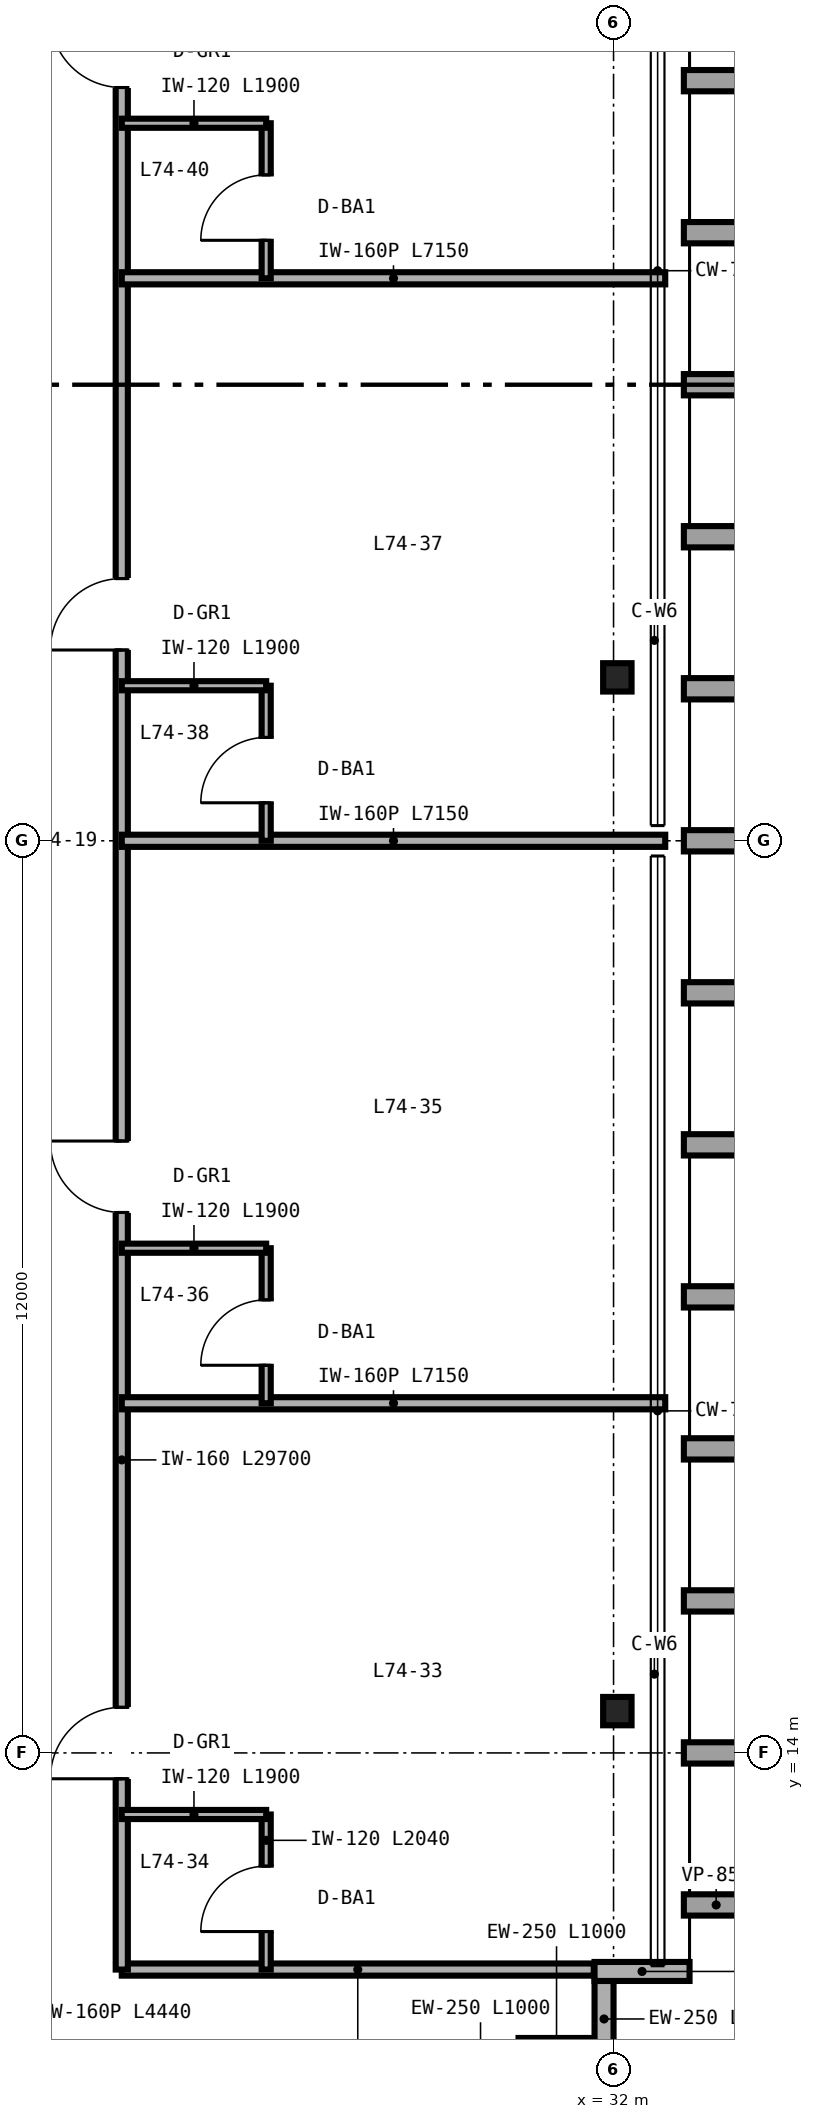
"""IFC4 building model, lengths in metres.
Left out: names, types, materials, properties, quantities, classifications, styles, units other than length and angle.
Written with IfcOpenShell. Run it as: python <this file> out.ifc"""

import sys

from ifc_helpers import new_model, si_unit, direction, frame, frame_2d, origin, origin_2d, place, context, subcontext, project, spatial, rectangle, i_section, extrude, source, transform, mapped, element, fill, save


model = new_model("IFC4")
c1 = context("Model", 3, precision=1e-05, world=origin(), true_north=direction((0.0, 1.0)))
c2 = subcontext(c1, "Body", "Model", "MODEL_VIEW")
j1 = project(units=[si_unit("LENGTHUNIT", "METRE"), si_unit("PLANEANGLEUNIT", "RADIAN")], contexts=[c1])
p1 = place(None, origin())
s1 = spatial("IfcSite", under=j1, at=p1, CompositionType="ELEMENT")
p2 = place(p1, origin())
s2 = spatial("IfcBuilding", under=s1, at=p2, CompositionType="ELEMENT")
p3 = place(p2, frame((0.0, 0.0, 290.4)))
s3 = spatial("IfcBuildingStorey", under=s2, at=p3, CompositionType="ELEMENT", Elevation=290.4)
m1 = source(origin(), c2, "Body", "SweptSolid", [
    extrude(i_section(OverallWidth=0.374, OverallDepth=0.373, WebThickness=0.016, FlangeThickness=0.026, FilletRadius=0.025, at=origin_2d()), origin(), (0.0, 0.0, 1.0), 3.38),
])
for number, where, z_axis, x_axis in (
    (1, (32.05, 14.55, 0.0), (0.0, 0.0, 1.0), (1.0, 0.0, 0.0)),
    (2, (32.05, 28.15, 0.0), (0.0, 0.0, 1.0), (1.0, 0.0, 0.0)),
):
    element("IfcColumn", number, at=place(p3, frame(where, z_axis=z_axis, x_axis=x_axis)), inside=s3, PredefinedType="COLUMN", context=c2, shape_type="MappedRepresentation", body=[
        mapped(m1, transform((0.0, 0.0, 0.0), scale=1.0)),
    ])
for number, where, z_axis, x_axis in (
    (3, (30.75, 10.125, 0.0), (0.0, 0.0, 1.0), (1.0, 0.0, 0.0)),
    (4, (31.875, 10.0, 0.0), (0.0, 0.0, 1.0), (0.0, 1.0, 0.0)),
):
    element("IfcWall", number, at=place(p3, frame(where, z_axis=z_axis, x_axis=x_axis)), inside=s3, PredefinedType="SOLIDWALL", context=c2, shape_type="SweptSolid", body=[
        extrude(rectangle(XDim=1.0, YDim=0.25, at=frame_2d((0.5, 0.0))), origin(), (0.0, 0.0, 1.0), 3.38),
    ])
p4 = place(p3, frame((31.75, 11.125, 0.0), z_axis=(0.0, 0.0, 1.0), x_axis=(1.0, 0.0, 0.0)))
e5 = element("IfcWall", 5, at=p4, inside=s3, PredefinedType="SOLIDWALL", context=c2, shape_type="SweptSolid", body=[
    extrude(rectangle(XDim=1.25, YDim=0.25, at=frame_2d((0.625, 0.0))), origin(), (0.0, 0.0, 1.0), 3.38),
])
p5 = place(p3, frame((25.53, 11.15, 0.0), z_axis=(0.0, 0.0, 1.0), x_axis=(1.0, 0.0, 0.0)))
e6 = element("IfcWall", 6, at=p5, inside=s3, PredefinedType="PARTITIONING", context=c2, shape_type="SweptSolid", body=[
    extrude(rectangle(XDim=6.21, YDim=0.16, at=frame_2d((3.105, 0.0))), origin(), (0.0, 0.0, 1.0), 3.38),
])
p6 = place(p3, frame((25.53, 11.15, 0.0), z_axis=(0.0, 0.0, 1.0), x_axis=(0.0, 1.0, 0.0)))
e7 = element("IfcWall", 7, at=p6, inside=s3, PredefinedType="PARTITIONING", context=c2, shape_type="SweptSolid", body=[
    extrude(rectangle(XDim=29.7, YDim=0.16, at=frame_2d((14.85, 0.0))), origin(), (0.0, 0.0, 1.0), 2.524),
])
p7 = place(p6, frame((2.51, 0.0, 0.0)))
e8 = element("IfcOpeningElement", 8, at=p7, cuts=e7, PredefinedType="OPENING", context=c2, shape_type="SweptSolid", body=[
    extrude(rectangle(XDim=0.94, YDim=2.15, at=frame_2d((0.47, 1.075))), frame((0.0, 0.09, 0.0), z_axis=(0.0, -1.0, 0.0), x_axis=(1.0, 0.0, 0.0)), (0.0, 0.0, 1.0), 0.18),
])
p8 = place(p6, frame((9.96, 0.0, 0.0)))
e9 = element("IfcOpeningElement", 9, at=p8, cuts=e7, PredefinedType="OPENING", context=c2, shape_type="SweptSolid", body=[
    extrude(rectangle(XDim=0.94, YDim=2.15, at=frame_2d((0.47, 1.075))), frame((0.0, 0.09, 0.0), z_axis=(0.0, -1.0, 0.0), x_axis=(1.0, 0.0, 0.0)), (0.0, 0.0, 1.0), 0.18),
])
p9 = place(p6, frame((17.36, 0.0, 0.0)))
e10 = element("IfcOpeningElement", 10, at=p9, cuts=e7, PredefinedType="OPENING", context=c2, shape_type="SweptSolid", body=[
    extrude(rectangle(XDim=0.94, YDim=2.15, at=frame_2d((0.47, 1.075))), frame((0.0, 0.09, 0.0), z_axis=(0.0, -1.0, 0.0), x_axis=(1.0, 0.0, 0.0)), (0.0, 0.0, 1.0), 0.18),
])
p10 = place(p6, frame((24.76, 0.0, 0.0)))
e11 = element("IfcOpeningElement", 11, at=p10, cuts=e7, PredefinedType="OPENING", context=c2, shape_type="SweptSolid", body=[
    extrude(rectangle(XDim=0.94, YDim=2.15, at=frame_2d((0.47, 1.075))), frame((0.0, 0.09, 0.0), z_axis=(0.0, -1.0, 0.0), x_axis=(1.0, 0.0, 0.0)), (0.0, 0.0, 1.0), 0.18),
])
p11 = place(p3, frame((25.53, 18.6, 0.0), z_axis=(0.0, 0.0, 1.0), x_axis=(1.0, 0.0, 0.0)))
e12 = element("IfcWall", 12, at=p11, inside=s3, PredefinedType="PARTITIONING", context=c2, shape_type="SweptSolid", body=[
    extrude(rectangle(XDim=7.15, YDim=0.16, at=frame_2d((3.575, 0.0))), origin(), (0.0, 0.0, 1.0), 2.601),
])
p12 = place(p3, frame((27.43, 11.15, 0.0), z_axis=(0.0, 0.0, 1.0), x_axis=(0.0, 1.0, 0.0)))
e13 = element("IfcWall", 13, at=p12, inside=s3, PredefinedType="PARTITIONING", context=c2, shape_type="SweptSolid", body=[
    extrude(rectangle(XDim=2.04, YDim=0.12, at=frame_2d((1.02, 0.0))), origin(), (0.0, 0.0, 1.0), 3.38),
])
p13 = place(p12, frame((0.5, 0.0, 0.0)))
e14 = element("IfcOpeningElement", 14, at=p13, cuts=e13, PredefinedType="OPENING", context=c2, shape_type="SweptSolid", body=[
    extrude(rectangle(XDim=0.86, YDim=2.1, at=frame_2d((0.43, 1.05))), frame((0.0, 0.07, 0.0), z_axis=(0.0, -1.0, 0.0), x_axis=(1.0, 0.0, 0.0)), (0.0, 0.0, 1.0), 0.14),
])
p14 = place(p3, frame((25.53, 13.19, 0.0), z_axis=(0.0, 0.0, 1.0), x_axis=(1.0, 0.0, 0.0)))
e15 = element("IfcWall", 15, at=p14, inside=s3, PredefinedType="PARTITIONING", context=c2, shape_type="SweptSolid", body=[
    extrude(rectangle(XDim=1.9, YDim=0.12, at=frame_2d((0.95, 0.0))), origin(), (0.0, 0.0, 1.0), 3.38),
])
p15 = place(p3, frame((25.53, 26.0, 0.0), z_axis=(0.0, 0.0, 1.0), x_axis=(1.0, 0.0, 0.0)))
e16 = element("IfcWall", 16, at=p15, inside=s3, PredefinedType="PARTITIONING", context=c2, shape_type="SweptSolid", body=[
    extrude(rectangle(XDim=7.15, YDim=0.16, at=frame_2d((3.575, 0.0))), origin(), (0.0, 0.0, 1.0), 2.601),
])
p16 = place(p3, frame((27.43, 18.6, 0.0), z_axis=(0.0, 0.0, 1.0), x_axis=(0.0, 1.0, 0.0)))
e17 = element("IfcWall", 17, at=p16, inside=s3, PredefinedType="PARTITIONING", context=c2, shape_type="SweptSolid", body=[
    extrude(rectangle(XDim=2.04, YDim=0.12, at=frame_2d((1.02, 0.0))), origin(), (0.0, 0.0, 1.0), 3.38),
])
p17 = place(p16, frame((0.5, 0.0, 0.0)))
e18 = element("IfcOpeningElement", 18, at=p17, cuts=e17, PredefinedType="OPENING", context=c2, shape_type="SweptSolid", body=[
    extrude(rectangle(XDim=0.86, YDim=2.1, at=frame_2d((0.43, 1.05))), frame((0.0, 0.07, 0.0), z_axis=(0.0, -1.0, 0.0), x_axis=(1.0, 0.0, 0.0)), (0.0, 0.0, 1.0), 0.14),
])
p18 = place(p3, frame((25.53, 20.64, 0.0), z_axis=(0.0, 0.0, 1.0), x_axis=(1.0, 0.0, 0.0)))
e19 = element("IfcWall", 19, at=p18, inside=s3, PredefinedType="PARTITIONING", context=c2, shape_type="SweptSolid", body=[
    extrude(rectangle(XDim=1.9, YDim=0.12, at=frame_2d((0.95, 0.0))), origin(), (0.0, 0.0, 1.0), 3.38),
])
p19 = place(p3, frame((25.53, 33.4, 0.0), z_axis=(0.0, 0.0, 1.0), x_axis=(1.0, 0.0, 0.0)))
e20 = element("IfcWall", 20, at=p19, inside=s3, PredefinedType="PARTITIONING", context=c2, shape_type="SweptSolid", body=[
    extrude(rectangle(XDim=7.15, YDim=0.16, at=frame_2d((3.575, 0.0))), origin(), (0.0, 0.0, 1.0), 2.763),
])
p20 = place(p3, frame((27.43, 26.0, 0.0), z_axis=(0.0, 0.0, 1.0), x_axis=(0.0, 1.0, 0.0)))
e21 = element("IfcWall", 21, at=p20, inside=s3, PredefinedType="PARTITIONING", context=c2, shape_type="SweptSolid", body=[
    extrude(rectangle(XDim=2.04, YDim=0.12, at=frame_2d((1.02, 0.0))), origin(), (0.0, 0.0, 1.0), 2.524),
])
p21 = place(p20, frame((0.5, 0.0, 0.0)))
e22 = element("IfcOpeningElement", 22, at=p21, cuts=e21, PredefinedType="OPENING", context=c2, shape_type="SweptSolid", body=[
    extrude(rectangle(XDim=0.86, YDim=2.1, at=frame_2d((0.43, 1.05))), frame((0.0, 0.07, 0.0), z_axis=(0.0, -1.0, 0.0), x_axis=(1.0, 0.0, 0.0)), (0.0, 0.0, 1.0), 0.14),
])
p22 = place(p3, frame((25.53, 28.04, 0.0), z_axis=(0.0, 0.0, 1.0), x_axis=(1.0, 0.0, 0.0)))
e23 = element("IfcWall", 23, at=p22, inside=s3, PredefinedType="PARTITIONING", context=c2, shape_type="SweptSolid", body=[
    extrude(rectangle(XDim=1.9, YDim=0.12, at=frame_2d((0.95, 0.0))), origin(), (0.0, 0.0, 1.0), 2.524),
])
p23 = place(p3, frame((27.43, 33.4, 0.0), z_axis=(0.0, 0.0, 1.0), x_axis=(0.0, 1.0, 0.0)))
e24 = element("IfcWall", 24, at=p23, inside=s3, PredefinedType="PARTITIONING", context=c2, shape_type="SweptSolid", body=[
    extrude(rectangle(XDim=2.04, YDim=0.12, at=frame_2d((1.02, 0.0))), origin(), (0.0, 0.0, 1.0), 3.38),
])
p24 = place(p23, frame((0.5, 0.0, 0.0)))
e25 = element("IfcOpeningElement", 25, at=p24, cuts=e24, PredefinedType="OPENING", context=c2, shape_type="SweptSolid", body=[
    extrude(rectangle(XDim=0.86, YDim=2.1, at=frame_2d((0.43, 1.05))), frame((0.0, 0.07, 0.0), z_axis=(0.0, -1.0, 0.0), x_axis=(1.0, 0.0, 0.0)), (0.0, 0.0, 1.0), 0.14),
])
p25 = place(p3, frame((25.53, 35.44, 0.0), z_axis=(0.0, 0.0, 1.0), x_axis=(1.0, 0.0, 0.0)))
e26 = element("IfcWall", 26, at=p25, inside=s3, PredefinedType="PARTITIONING", context=c2, shape_type="SweptSolid", body=[
    extrude(rectangle(XDim=1.9, YDim=0.12, at=frame_2d((0.95, 0.0))), origin(), (0.0, 0.0, 1.0), 3.38),
])
m2 = source(origin(), c2, "Body", "SweptSolid", [
    extrude(rectangle(XDim=0.86, YDim=2.1, at=frame_2d((0.43, 1.05))), frame((0.0, 0.025, 0.0), z_axis=(0.0, -1.0, 0.0), x_axis=(1.0, 0.0, 0.0)), (0.0, 0.0, 1.0), 0.05),
])
p26 = place(p13, origin())
e27 = element("IfcDoor", 27, at=p26, inside=s3, OperationType="SINGLE_SWING_LEFT", PredefinedType="DOOR", context=c2, shape_type="MappedRepresentation", body=[
    mapped(m2, transform((0.0, 0.0, 0.0), scale=1.0)),
])
fill(e14, e27)
m3 = source(origin(), c2, "Body", "SweptSolid", [
    extrude(rectangle(XDim=0.94, YDim=2.15, at=frame_2d((0.47, 1.075))), frame((0.0, 0.025, 0.0), z_axis=(0.0, -1.0, 0.0), x_axis=(1.0, 0.0, 0.0)), (0.0, 0.0, 1.0), 0.05),
])
p27 = place(p7, origin())
e28 = element("IfcDoor", 28, at=p27, inside=s3, OperationType="SINGLE_SWING_LEFT", PredefinedType="DOOR", context=c2, shape_type="MappedRepresentation", body=[
    mapped(m3, transform((0.0, 0.0, 0.0), scale=1.0)),
])
fill(e8, e28)
p28 = place(p17, origin())
e29 = element("IfcDoor", 29, at=p28, inside=s3, OperationType="SINGLE_SWING_LEFT", PredefinedType="DOOR", context=c2, shape_type="MappedRepresentation", body=[
    mapped(m2, transform((0.0, 0.0, 0.0), scale=1.0)),
])
fill(e18, e29)
p29 = place(p8, origin())
e30 = element("IfcDoor", 30, at=p29, inside=s3, OperationType="SINGLE_SWING_RIGHT", PredefinedType="DOOR", context=c2, shape_type="MappedRepresentation", body=[
    mapped(m3, transform((0.0, 0.0, 0.0), scale=1.0)),
])
fill(e9, e30)
p30 = place(p21, origin())
e31 = element("IfcDoor", 31, at=p30, inside=s3, OperationType="SINGLE_SWING_LEFT", PredefinedType="DOOR", context=c2, shape_type="MappedRepresentation", body=[
    mapped(m2, transform((0.0, 0.0, 0.0), scale=1.0)),
])
fill(e22, e31)
p31 = place(p9, origin())
e32 = element("IfcDoor", 32, at=p31, inside=s3, OperationType="SINGLE_SWING_LEFT", PredefinedType="DOOR", context=c2, shape_type="MappedRepresentation", body=[
    mapped(m3, transform((0.0, 0.0, 0.0), scale=1.0)),
])
fill(e10, e32)
p32 = place(p24, origin())
e33 = element("IfcDoor", 33, at=p32, inside=s3, OperationType="SINGLE_SWING_LEFT", PredefinedType="DOOR", context=c2, shape_type="MappedRepresentation", body=[
    mapped(m2, transform((0.0, 0.0, 0.0), scale=1.0)),
])
fill(e25, e33)
p33 = place(p10, origin())
e34 = element("IfcDoor", 34, at=p33, inside=s3, OperationType="SINGLE_SWING_RIGHT", PredefinedType="DOOR", context=c2, shape_type="MappedRepresentation", body=[
    mapped(m3, transform((0.0, 0.0, 0.0), scale=1.0)),
])
fill(e11, e34)
save(model, sys.argv[1])
